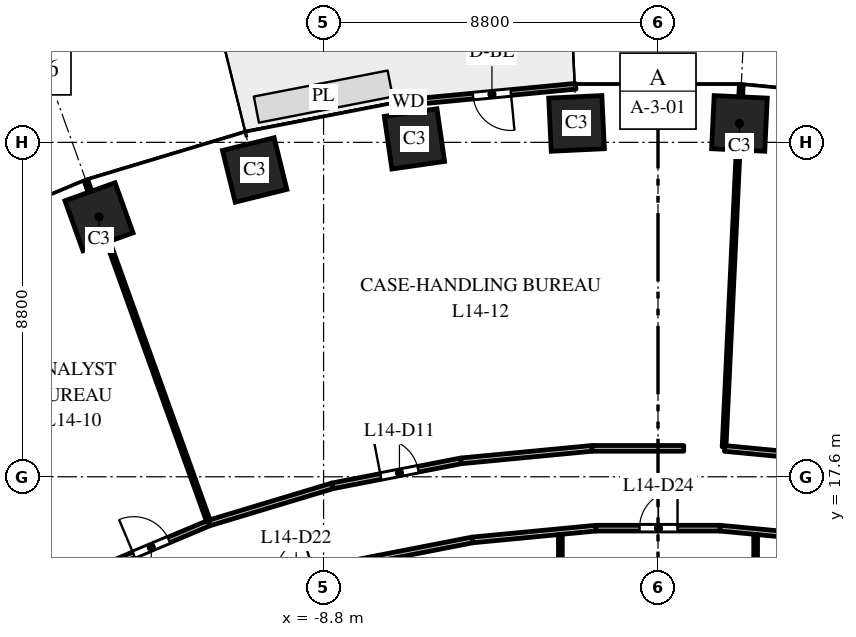
"""IFC4 building model, lengths in metres.
Left out: names, types, materials, properties, quantities, classifications, styles, units other than length and angle.
Written with IfcOpenShell. Run it as: python <this file> out.ifc"""

import sys

from ifc_helpers import new_model, si_unit, direction, frame, frame_2d, origin, origin_2d, place, context, subcontext, project, spatial, rectangle, extrude, element, fill, save


model = new_model("IFC4")
c1 = context("Model", 3, precision=1e-05, world=origin(), true_north=direction((0.0, 1.0)))
c2 = subcontext(c1, "Body", "Model", "MODEL_VIEW")
j1 = project(units=[si_unit("LENGTHUNIT", "METRE"), si_unit("PLANEANGLEUNIT", "RADIAN")], contexts=[c1])
p1 = place(None, origin())
s1 = spatial("IfcSite", under=j1, at=p1, CompositionType="ELEMENT")
p2 = place(p1, origin())
s2 = spatial("IfcBuilding", under=s1, at=p2, CompositionType="ELEMENT")
p3 = place(p2, frame((0.0, 0.0, 66.5)))
s3 = spatial("IfcBuildingStorey", under=s2, at=p3, CompositionType="ELEMENT", Elevation=66.5)
for number, where, z_axis, x_axis in (
    (1, (2.143, 26.898, 0.0), (0.0, 0.0, 1.0), (-0.999, 0.048, 0.0)),
    (2, (-2.143, 26.898, 0.0), (0.0, 0.0, 1.0), (-0.999, -0.048, 0.0)),
    (3, (-6.409, 26.491, 0.0), (0.0, 0.0, 1.0), (-0.99, -0.143, 0.0)),
    (4, (-10.613, 25.674, 0.0), (0.0, 0.0, 1.0), (-0.971, -0.24, 0.0)),
    (5, (-14.709, 24.441, 0.0), (0.0, 0.0, 1.0), (-0.941, -0.338, 0.0)),
):
    element("IfcColumn", number, at=place(p3, frame(where, z_axis=z_axis, x_axis=x_axis)), inside=s3, PredefinedType="COLUMN", context=c2, shape_type="SweptSolid", body=[
        extrude(rectangle(XDim=1.4, YDim=1.4, at=origin_2d()), origin(), (0.0, 0.0, 1.0), 4.0),
    ])
p4 = place(p3, frame((-2.166, 27.875, 0.0), z_axis=(0.0, 0.0, 1.0), x_axis=(-0.995473879823, -0.095035543824, 0.0)))
e6 = element("IfcWall", 6, at=p4, inside=s3, PredefinedType="STANDARD", context=c2, shape_type="SweptSolid", body=[
    extrude(rectangle(XDim=4.426, YDim=0.15, at=frame_2d((2.213, 0.0))), origin(), (0.0, 0.0, 1.0), 3.7),
])
p5 = place(p4, frame((1.713, 0.0, 0.0)))
e7 = element("IfcOpeningElement", 7, at=p5, cuts=e6, PredefinedType="OPENING", context=c2, shape_type="SweptSolid", body=[
    extrude(rectangle(XDim=1.0, YDim=2.4, at=frame_2d((0.5, 1.2))), frame((0.0, 0.085, 0.0), z_axis=(0.0, -1.0, 0.0), x_axis=(1.0, 0.0, 0.0)), (0.0, 0.0, 1.0), 0.17),
])
p6 = place(p3, frame((-15.048, 25.383, 0.0), z_axis=(0.0, 0.0, 1.0), x_axis=(0.338338680362, -0.941024408488, 0.0)))
e8 = element("IfcWall", 8, at=p6, inside=s3, PredefinedType="PARTITIONING", context=c2, shape_type="SweptSolid", body=[
    extrude(rectangle(XDim=9.559, YDim=0.1, at=frame_2d((4.779, 0.0))), origin(), (0.0, 0.0, 1.0), 2.85),
])
p7 = place(p3, frame((-14.885, 15.092, 0.0), z_axis=(0.0, 0.0, 1.0), x_axis=(0.921844706698, 0.387559462189, 0.0)))
e9 = element("IfcWall", 9, at=p7, inside=s3, PredefinedType="PARTITIONING", context=c2, shape_type="SweptSolid", body=[
    extrude(rectangle(XDim=3.313, YDim=0.15, at=frame_2d((1.656, 0.0))), origin(), (0.0, 0.0, 1.0), 2.85),
])
p8 = place(p7, frame((1.184, 0.0, 0.0)))
e10 = element("IfcOpeningElement", 10, at=p8, cuts=e9, PredefinedType="OPENING", context=c2, shape_type="SweptSolid", body=[
    extrude(rectangle(XDim=1.0, YDim=2.1, at=frame_2d((0.5, 1.05))), frame((0.0, 0.085, 0.0), z_axis=(0.0, -1.0, 0.0), x_axis=(1.0, 0.0, 0.0)), (0.0, 0.0, 1.0), 0.17),
])
p9 = place(p3, frame((-11.812, 16.384, 0.0), z_axis=(0.0, 0.0, 1.0), x_axis=(0.95754884035, 0.28827108482, 0.0)))
e11 = element("IfcWall", 11, at=p9, inside=s3, PredefinedType="PARTITIONING", context=c2, shape_type="SweptSolid", body=[
    extrude(rectangle(XDim=3.396, YDim=0.15, at=frame_2d((1.698, 0.0))), origin(), (0.0, 0.0, 1.0), 3.7),
])
p10 = place(p3, frame((-8.56, 17.363, 0.0), z_axis=(0.0, 0.0, 1.0), x_axis=(0.981639027618, 0.1907480523, 0.0)))
e12 = element("IfcWall", 12, at=p10, inside=s3, PredefinedType="PARTITIONING", context=c2, shape_type="SweptSolid", body=[
    extrude(rectangle(XDim=3.439, YDim=0.15, at=frame_2d((1.72, 0.0))), origin(), (0.0, 0.0, 1.0), 2.85),
])
p11 = place(p10, frame((1.289, 0.0, 0.0)))
e13 = element("IfcOpeningElement", 13, at=p11, cuts=e12, PredefinedType="OPENING", context=c2, shape_type="SweptSolid", body=[
    extrude(rectangle(XDim=1.0, YDim=2.1, at=frame_2d((0.5, 1.05))), frame((0.0, 0.085, 0.0), z_axis=(0.0, -1.0, 0.0), x_axis=(1.0, 0.0, 0.0)), (0.0, 0.0, 1.0), 0.17),
])
p12 = place(p3, frame((-8.056, 15.321, 0.0), z_axis=(0.0, 0.0, 1.0), x_axis=(0.981604377859, 0.190926282547, 0.0)))
e14 = element("IfcWall", 14, at=p12, inside=s3, PredefinedType="PARTITIONING", context=c2, shape_type="SweptSolid", body=[
    extrude(rectangle(XDim=3.231, YDim=0.15, at=frame_2d((1.616, 0.0))), origin(), (0.0, 0.0, 1.0), 2.85),
])
p13 = place(p3, frame((-5.184, 18.019, 0.0), z_axis=(0.0, 0.0, 1.0), x_axis=(0.995482474707, 0.09494547146, 0.0)))
e15 = element("IfcWall", 15, at=p13, inside=s3, PredefinedType="PARTITIONING", context=c2, shape_type="SweptSolid", body=[
    extrude(rectangle(XDim=3.464, YDim=0.15, at=frame_2d((1.732, 0.0))), origin(), (0.0, 0.0, 1.0), 3.7),
])
p14 = place(p3, frame((-4.884, 15.938, 0.0), z_axis=(0.0, 0.0, 1.0), x_axis=(0.99547459835, 0.095028017131, 0.0)))
e16 = element("IfcWall", 16, at=p14, inside=s3, PredefinedType="PARTITIONING", context=c2, shape_type="SweptSolid", body=[
    extrude(rectangle(XDim=3.263, YDim=0.15, at=frame_2d((1.631, 0.0))), origin(), (0.0, 0.0, 1.0), 3.7),
])
p15 = place(p3, frame((-2.569, 7.161, 0.0), z_axis=(0.0, 0.0, 1.0), x_axis=(0.0, 1.0, 0.0)))
e17 = element("IfcWall", 17, at=p15, inside=s3, PredefinedType="PARTITIONING", context=c2, shape_type="SweptSolid", body=[
    extrude(rectangle(XDim=8.919, YDim=0.1, at=frame_2d((4.459, 0.0))), origin(), (0.0, 0.0, 1.0), 2.85),
])
p16 = place(p3, frame((-1.736, 18.348, 0.0), z_axis=(0.0, 0.0, 1.0), x_axis=(1.0, 0.0, 0.0)))
e18 = element("IfcWall", 18, at=p16, inside=s3, PredefinedType="PARTITIONING", context=c2, shape_type="SweptSolid", body=[
    extrude(rectangle(XDim=2.413, YDim=0.15, at=frame_2d((1.207, 0.0))), origin(), (0.0, 0.0, 1.0), 2.85),
])
p17 = place(p3, frame((-1.636, 16.248, 0.0), z_axis=(0.0, 0.0, 1.0), x_axis=(1.0, 0.0, 0.0)))
e19 = element("IfcWall", 19, at=p17, inside=s3, PredefinedType="PARTITIONING", context=c2, shape_type="SweptSolid", body=[
    extrude(rectangle(XDim=3.272, YDim=0.15, at=frame_2d((1.636, 0.0))), origin(), (0.0, 0.0, 1.0), 2.85),
])
p18 = place(p17, frame((1.15, 0.0, 0.0)))
e20 = element("IfcOpeningElement", 20, at=p18, cuts=e19, PredefinedType="OPENING", context=c2, shape_type="SweptSolid", body=[
    extrude(rectangle(XDim=1.0, YDim=2.1, at=frame_2d((0.5, 1.05))), frame((0.0, 0.085, 0.0), z_axis=(0.0, -1.0, 0.0), x_axis=(1.0, 0.0, 0.0)), (0.0, 0.0, 1.0), 0.17),
])
p19 = place(p3, frame((1.636, 16.248, 0.0), z_axis=(0.0, 0.0, 1.0), x_axis=(0.99547459835, -0.095028017131, 0.0)))
e21 = element("IfcWall", 21, at=p19, inside=s3, PredefinedType="PARTITIONING", context=c2, shape_type="SweptSolid", body=[
    extrude(rectangle(XDim=3.263, YDim=0.15, at=frame_2d((1.631, 0.0))), origin(), (0.0, 0.0, 1.0), 2.85),
])
p20 = place(p3, frame((1.739, 18.386, 0.0), z_axis=(0.0, 0.0, 1.0), x_axis=(0.04735320064, 0.998878207986, 0.0)))
e22 = element("IfcWall", 22, at=p20, inside=s3, PredefinedType="PARTITIONING", context=c2, shape_type="SweptSolid", body=[
    extrude(rectangle(XDim=9.523, YDim=0.1, at=frame_2d((4.761, 0.0))), origin(), (0.0, 0.0, 1.0), 2.85),
])
p21 = place(p3, frame((1.756, 18.346, 0.0), z_axis=(0.0, 0.0, 1.0), x_axis=(0.99548367506, -0.094932885187, 0.0)))
e23 = element("IfcWall", 23, at=p21, inside=s3, PredefinedType="PARTITIONING", context=c2, shape_type="SweptSolid", body=[
    extrude(rectangle(XDim=3.444, YDim=0.15, at=frame_2d((1.722, 0.0))), origin(), (0.0, 0.0, 1.0), 2.85),
])
p22 = place(p3, frame((2.569, 7.161, 0.0), z_axis=(0.0, 0.0, 1.0), x_axis=(0.0, 1.0, 0.0)))
e24 = element("IfcWall", 24, at=p22, inside=s3, PredefinedType="PARTITIONING", context=c2, shape_type="SweptSolid", body=[
    extrude(rectangle(XDim=8.919, YDim=0.1, at=frame_2d((4.459, 0.0))), origin(), (0.0, 0.0, 1.0), 2.85),
])
p23 = place(p5, origin())
e25 = element("IfcDoor", 25, at=p23, inside=s3, OperationType="SINGLE_SWING_LEFT", PredefinedType="DOOR", context=c2, shape_type="SweptSolid", body=[
    extrude(rectangle(XDim=1.0, YDim=2.4, at=frame_2d((0.5, 1.2))), frame((0.0, 0.025, 0.0), z_axis=(0.0, -1.0, 0.0), x_axis=(1.0, 0.0, 0.0)), (0.0, 0.0, 1.0), 0.05),
])
fill(e7, e25)
p24 = place(p8, origin())
e26 = element("IfcDoor", 26, at=p24, inside=s3, OperationType="SINGLE_SWING_LEFT", PredefinedType="DOOR", context=c2, shape_type="SweptSolid", body=[
    extrude(rectangle(XDim=1.0, YDim=2.1, at=frame_2d((0.5, 1.05))), frame((0.0, 0.025, 0.0), z_axis=(0.0, -1.0, 0.0), x_axis=(1.0, 0.0, 0.0)), (0.0, 0.0, 1.0), 0.05),
])
fill(e10, e26)
p25 = place(p11, origin())
e27 = element("IfcDoor", 27, at=p25, inside=s3, OperationType="SINGLE_SWING_LEFT", PredefinedType="DOOR", context=c2, shape_type="SweptSolid", body=[
    extrude(rectangle(XDim=1.0, YDim=2.1, at=frame_2d((0.5, 1.05))), frame((0.0, 0.025, 0.0), z_axis=(0.0, -1.0, 0.0), x_axis=(1.0, 0.0, 0.0)), (0.0, 0.0, 1.0), 0.05),
])
fill(e13, e27)
p26 = place(p18, origin())
e28 = element("IfcDoor", 28, at=p26, inside=s3, OperationType="SINGLE_SWING_RIGHT", PredefinedType="DOOR", context=c2, shape_type="SweptSolid", body=[
    extrude(rectangle(XDim=1.0, YDim=2.1, at=frame_2d((0.5, 1.05))), frame((0.0, 0.025, 0.0), z_axis=(0.0, -1.0, 0.0), x_axis=(1.0, 0.0, 0.0)), (0.0, 0.0, 1.0), 0.05),
])
fill(e20, e28)
save(model, sys.argv[1])
